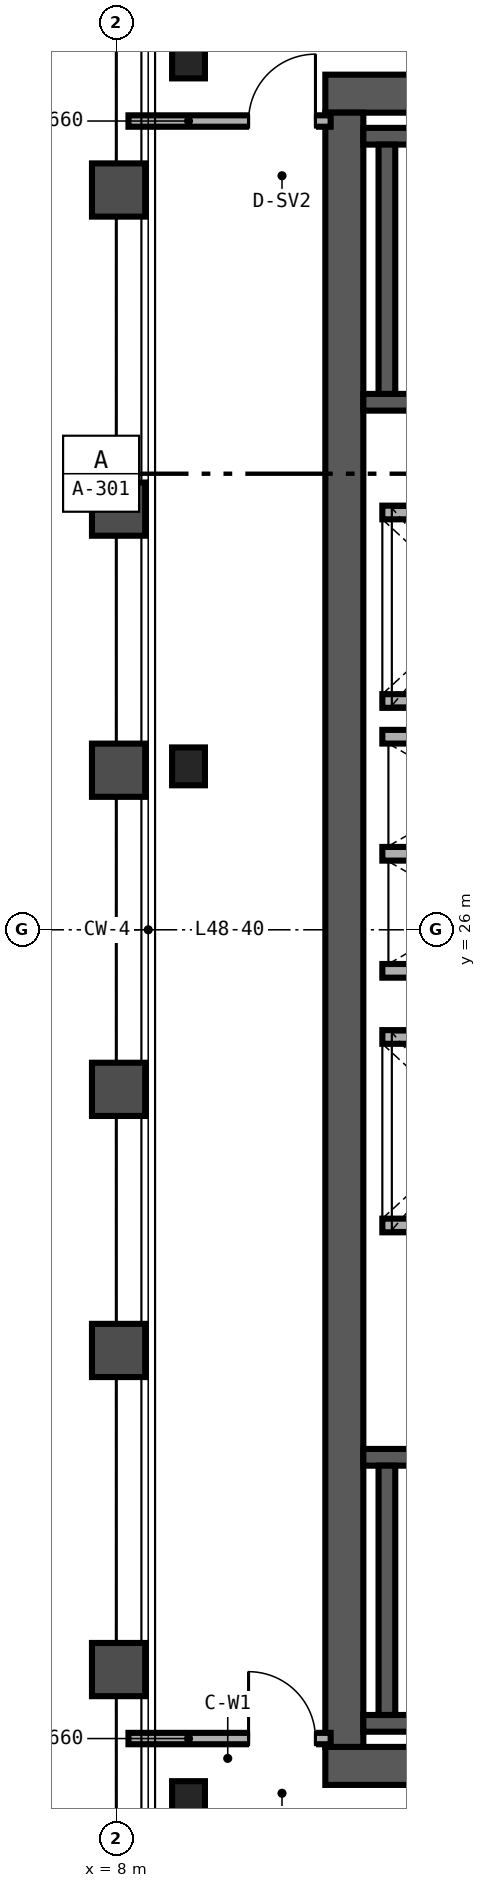
"""IFC4 building model, lengths in metres.
Left out: names, types, materials, properties, quantities, classifications, styles, units other than length and angle.
Written with IfcOpenShell. Run it as: python <this file> out.ifc"""

import sys

from ifc_helpers import new_model, si_unit, direction, frame, frame_2d, origin, origin_2d, place, context, subcontext, project, spatial, rectangle, i_section, extrude, source, transform, mapped, element, fill, save


model = new_model("IFC4")
c1 = context("Model", 3, precision=1e-05, world=origin(), true_north=direction((0.0, 1.0)))
c2 = subcontext(c1, "Body", "Model", "MODEL_VIEW")
j1 = project(units=[si_unit("LENGTHUNIT", "METRE"), si_unit("PLANEANGLEUNIT", "RADIAN")], contexts=[c1])
p1 = place(None, origin())
s1 = spatial("IfcSite", under=j1, at=p1, CompositionType="ELEMENT")
p2 = place(p1, origin())
s2 = spatial("IfcBuilding", under=s1, at=p2, CompositionType="ELEMENT")
p3 = place(p2, frame((0.0, 0.0, 192.0)))
s3 = spatial("IfcBuildingStorey", under=s2, at=p3, CompositionType="ELEMENT", Elevation=192.0)
p4 = place(p3, frame((10.75, 15.0, 0.0), z_axis=(0.0, 0.0, 1.0), x_axis=(1.0, 0.0, 0.0)))
e1 = element("IfcWall", 1, at=p4, inside=s3, PredefinedType="SHEAR", context=c2, shape_type="SweptSolid", body=[
    extrude(rectangle(XDim=12.5, YDim=0.5, at=frame_2d((6.25, 0.0))), origin(), (0.0, 0.0, 1.0), 3.37),
])
p5 = place(p4, frame((8.83, 0.0, 0.0)))
e2 = element("IfcOpeningElement", 2, at=p5, cuts=e1, PredefinedType="OPENING", context=c2, shape_type="SweptSolid", body=[
    extrude(rectangle(XDim=1.0, YDim=2.15, at=frame_2d((0.5, 1.075))), frame((0.0, 0.26, 0.0), z_axis=(0.0, -1.0, 0.0), x_axis=(1.0, 0.0, 0.0)), (0.0, 0.0, 1.0), 0.52),
])
p6 = place(p3, frame((10.75, 37.0, 0.0), z_axis=(0.0, 0.0, 1.0), x_axis=(1.0, 0.0, 0.0)))
e3 = element("IfcWall", 3, at=p6, inside=s3, PredefinedType="SHEAR", context=c2, shape_type="SweptSolid", body=[
    extrude(rectangle(XDim=12.5, YDim=0.5, at=frame_2d((6.25, 0.0))), origin(), (0.0, 0.0, 1.0), 3.37),
])
p7 = place(p6, frame((8.83, 0.0, 0.0)))
e4 = element("IfcOpeningElement", 4, at=p7, cuts=e3, PredefinedType="OPENING", context=c2, shape_type="SweptSolid", body=[
    extrude(rectangle(XDim=1.0, YDim=2.15, at=frame_2d((0.5, 1.075))), frame((0.0, 0.26, 0.0), z_axis=(0.0, -1.0, 0.0), x_axis=(1.0, 0.0, 0.0)), (0.0, 0.0, 1.0), 0.52),
])
p8 = place(p3, frame((11.0, 15.25, 0.0), z_axis=(0.0, 0.0, 1.0), x_axis=(0.0, 1.0, 0.0)))
e5 = element("IfcWall", 5, at=p8, inside=s3, PredefinedType="SHEAR", context=c2, shape_type="SweptSolid", body=[
    extrude(rectangle(XDim=21.5, YDim=0.5, at=frame_2d((10.75, 0.0))), origin(), (0.0, 0.0, 1.0), 3.37),
])
p9 = place(p3, frame((11.25, 15.56, 0.0), z_axis=(0.0, 0.0, 1.0), x_axis=(1.0, 0.0, 0.0)))
e6 = element("IfcWall", 6, at=p9, inside=s3, PredefinedType="SHEAR", context=c2, shape_type="SweptSolid", body=[
    extrude(rectangle(XDim=8.06, YDim=0.22, at=frame_2d((4.03, 0.0))), origin(), (0.0, 0.0, 1.0), 3.4),
])
p10 = place(p3, frame((11.25, 19.06, 0.0), z_axis=(0.0, 0.0, 1.0), x_axis=(1.0, 0.0, 0.0)))
e7 = element("IfcWall", 7, at=p10, inside=s3, PredefinedType="SHEAR", context=c2, shape_type="SweptSolid", body=[
    extrude(rectangle(XDim=8.06, YDim=0.22, at=frame_2d((4.03, 0.0))), origin(), (0.0, 0.0, 1.0), 3.4),
])
p11 = place(p10, frame((0.67, 0.0, 0.0)))
e8 = element("IfcOpeningElement", 8, at=p11, cuts=e7, PredefinedType="OPENING", context=c2, shape_type="SweptSolid", body=[
    extrude(rectangle(XDim=1.05, YDim=2.15, at=frame_2d((0.525, 1.075))), frame((0.0, 0.12, 0.0), z_axis=(0.0, -1.0, 0.0), x_axis=(1.0, 0.0, 0.0)), (0.0, 0.0, 1.0), 0.24),
])
p12 = place(p3, frame((11.56, 15.67, 0.0), z_axis=(0.0, 0.0, 1.0), x_axis=(0.0, 1.0, 0.0)))
e9 = element("IfcWall", 9, at=p12, inside=s3, PredefinedType="SHEAR", context=c2, shape_type="SweptSolid", body=[
    extrude(rectangle(XDim=3.28, YDim=0.22, at=frame_2d((1.64, 0.0))), origin(), (0.0, 0.0, 1.0), 3.4),
])
p13 = place(p3, frame((11.25, 32.94, 0.0), z_axis=(0.0, 0.0, 1.0), x_axis=(1.0, 0.0, 0.0)))
e10 = element("IfcWall", 10, at=p13, inside=s3, PredefinedType="SHEAR", context=c2, shape_type="SweptSolid", body=[
    extrude(rectangle(XDim=8.06, YDim=0.22, at=frame_2d((4.03, 0.0))), origin(), (0.0, 0.0, 1.0), 3.4),
])
p14 = place(p13, frame((0.67, 0.0, 0.0)))
e11 = element("IfcOpeningElement", 11, at=p14, cuts=e10, PredefinedType="OPENING", context=c2, shape_type="SweptSolid", body=[
    extrude(rectangle(XDim=1.05, YDim=2.15, at=frame_2d((0.525, 1.075))), frame((0.0, 0.12, 0.0), z_axis=(0.0, -1.0, 0.0), x_axis=(1.0, 0.0, 0.0)), (0.0, 0.0, 1.0), 0.24),
])
p15 = place(p3, frame((11.25, 36.44, 0.0), z_axis=(0.0, 0.0, 1.0), x_axis=(1.0, 0.0, 0.0)))
e12 = element("IfcWall", 12, at=p15, inside=s3, PredefinedType="SHEAR", context=c2, shape_type="SweptSolid", body=[
    extrude(rectangle(XDim=8.06, YDim=0.22, at=frame_2d((4.03, 0.0))), origin(), (0.0, 0.0, 1.0), 3.4),
])
p16 = place(p3, frame((11.56, 33.05, 0.0), z_axis=(0.0, 0.0, 1.0), x_axis=(0.0, 1.0, 0.0)))
e13 = element("IfcWall", 13, at=p16, inside=s3, PredefinedType="SHEAR", context=c2, shape_type="SweptSolid", body=[
    extrude(rectangle(XDim=3.28, YDim=0.22, at=frame_2d((1.64, 0.0))), origin(), (0.0, 0.0, 1.0), 3.4),
])
m1 = source(origin(), c2, "Body", "SweptSolid", [
    extrude(i_section(OverallWidth=0.432, OverallDepth=0.498, WebThickness=0.056, FlangeThickness=0.089, FilletRadius=0.025, at=origin_2d()), origin(), (0.0, 0.0, 1.0), 3.37),
])
for number, where, z_axis, x_axis in (
    (14, (8.95, 14.55, 0.0), (0.0, 0.0, 1.0), (1.0, 0.0, 0.0)),
    (15, (8.95, 28.15, 0.0), (0.0, 0.0, 1.0), (1.0, 0.0, 0.0)),
    (16, (8.95, 37.45, 0.0), (0.0, 0.0, 1.0), (1.0, 0.0, 0.0)),
):
    element("IfcColumn", number, at=place(p3, frame(where, z_axis=z_axis, x_axis=x_axis)), inside=s3, PredefinedType="COLUMN", context=c2, shape_type="MappedRepresentation", body=[
        mapped(m1, transform((0.0, 0.0, 0.0), scale=1.0)),
    ])
for number, where, z_axis, x_axis in (
    (17, (11.5, 22.11, 0.0), (0.0, 0.0, 1.0), (1.0, 0.0, 0.0)),
    (18, (11.5, 24.59, 0.0), (0.0, 0.0, 1.0), (1.0, 0.0, 0.0)),
    (19, (11.5, 29.01, 0.0), (0.0, 0.0, 1.0), (1.0, 0.0, 0.0)),
    (20, (11.5, 31.49, 0.0), (0.0, 0.0, 1.0), (1.0, 0.0, 0.0)),
):
    element("IfcWall", number, at=place(p3, frame(where, z_axis=z_axis, x_axis=x_axis)), inside=s3, PredefinedType="SOLIDWALL", context=c2, shape_type="SweptSolid", body=[
        extrude(rectangle(XDim=2.5, YDim=0.18, at=frame_2d((1.25, 0.0))), origin(), (0.0, 0.0, 1.0), 3.37),
    ])
for number, where, z_axis, x_axis in (
    (21, (11.5, 25.46, 0.0), (0.0, 0.0, 1.0), (1.0, 0.0, 0.0)),
    (22, (11.5, 27.0, 0.0), (0.0, 0.0, 1.0), (1.0, 0.0, 0.0)),
    (23, (11.5, 28.54, 0.0), (0.0, 0.0, 1.0), (1.0, 0.0, 0.0)),
):
    element("IfcWall", number, at=place(p3, frame(where, z_axis=z_axis, x_axis=x_axis)), inside=s3, PredefinedType="SOLIDWALL", context=c2, shape_type="SweptSolid", body=[
        extrude(rectangle(XDim=2.51, YDim=0.18, at=frame_2d((1.255, 0.0))), origin(), (0.0, 0.0, 1.0), 3.37),
    ])
p17 = place(p3, frame((8.16, 15.36, 0.0), z_axis=(0.0, 0.0, 1.0), x_axis=(1.0, 0.0, 0.0)))
e24 = element("IfcWall", 24, at=p17, inside=s3, PredefinedType="PARTITIONING", context=c2, shape_type="SweptSolid", body=[
    extrude(rectangle(XDim=2.66, YDim=0.15, at=frame_2d((1.33, 0.0))), origin(), (0.0, 0.0, 1.0), 2.591),
])
p18 = place(p17, frame((1.58, 0.0, 0.0)))
e25 = element("IfcOpeningElement", 25, at=p18, cuts=e24, PredefinedType="OPENING", context=c2, shape_type="SweptSolid", body=[
    extrude(rectangle(XDim=0.88, YDim=2.15, at=frame_2d((0.44, 1.075))), frame((0.0, 0.085, 0.0), z_axis=(0.0, -1.0, 0.0), x_axis=(1.0, 0.0, 0.0)), (0.0, 0.0, 1.0), 0.17),
])
p19 = place(p3, frame((8.16, 36.64, 0.0), z_axis=(0.0, 0.0, 1.0), x_axis=(1.0, 0.0, 0.0)))
e26 = element("IfcWall", 26, at=p19, inside=s3, PredefinedType="PARTITIONING", context=c2, shape_type="SweptSolid", body=[
    extrude(rectangle(XDim=2.66, YDim=0.15, at=frame_2d((1.33, 0.0))), origin(), (0.0, 0.0, 1.0), 2.753),
])
p20 = place(p19, frame((1.58, 0.0, 0.0)))
e27 = element("IfcOpeningElement", 27, at=p20, cuts=e26, PredefinedType="OPENING", context=c2, shape_type="SweptSolid", body=[
    extrude(rectangle(XDim=0.88, YDim=2.15, at=frame_2d((0.44, 1.075))), frame((0.0, 0.085, 0.0), z_axis=(0.0, -1.0, 0.0), x_axis=(1.0, 0.0, 0.0)), (0.0, 0.0, 1.0), 0.17),
])
m2 = source(origin(), c2, "Body", "SweptSolid", [
    extrude(rectangle(XDim=0.88, YDim=2.15, at=frame_2d((0.44, 1.075))), frame((0.0, 0.025, 0.0), z_axis=(0.0, -1.0, 0.0), x_axis=(1.0, 0.0, 0.0)), (0.0, 0.0, 1.0), 0.05),
])
p21 = place(p18, origin())
e28 = element("IfcDoor", 28, at=p21, inside=s3, OperationType="SINGLE_SWING_LEFT", PredefinedType="DOOR", context=c2, shape_type="MappedRepresentation", body=[
    mapped(m2, transform((0.0, 0.0, 0.0), scale=1.0)),
])
fill(e25, e28)
p22 = place(p20, origin())
e29 = element("IfcDoor", 29, at=p22, inside=s3, OperationType="SINGLE_SWING_RIGHT", PredefinedType="DOOR", context=c2, shape_type="MappedRepresentation", body=[
    mapped(m2, transform((0.0, 0.0, 0.0), scale=1.0)),
])
fill(e27, e29)
save(model, sys.argv[1])
